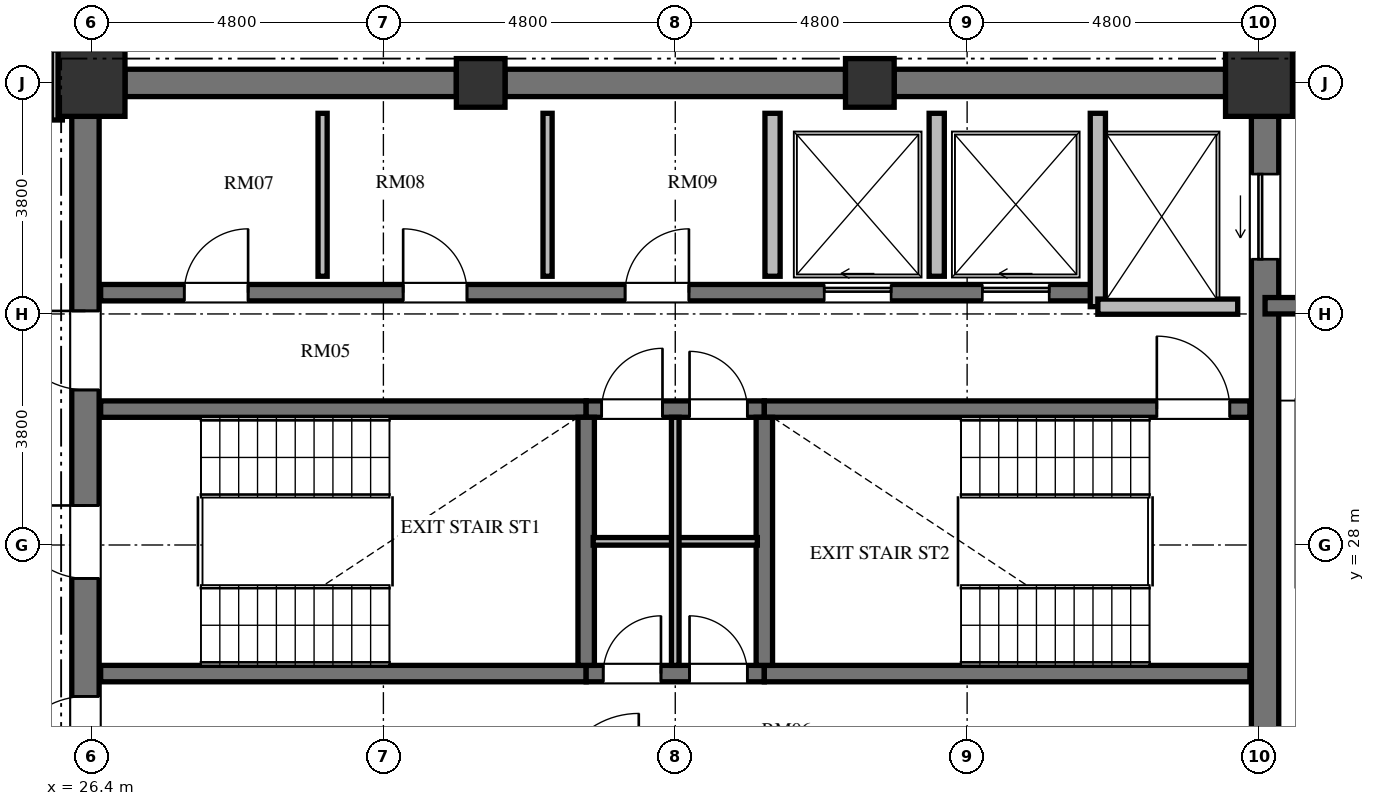
"""IFC4 building model, lengths in metres.
Left out: names, types, materials, properties, quantities, classifications, styles, units other than length and angle.
Written with IfcOpenShell. Run it as: python <this file> out.ifc"""

import sys

from ifc_helpers import new_model, si_unit, direction, frame, frame_2d, origin, origin_2d, place, context, subcontext, project, spatial, rectangle, extrude, element, fill, save


model = new_model("IFC4")
c1 = context("Model", 3, precision=1e-05, world=origin(), true_north=direction((0.0, 1.0)))
c2 = subcontext(c1, "Body", "Model", "MODEL_VIEW")
j1 = project(units=[si_unit("LENGTHUNIT", "METRE"), si_unit("PLANEANGLEUNIT", "RADIAN")], contexts=[c1])
p1 = place(None, origin())
s1 = spatial("IfcSite", under=j1, at=p1, CompositionType="ELEMENT")
p2 = place(p1, origin())
s2 = spatial("IfcBuilding", under=s1, at=p2, CompositionType="ELEMENT")
p3 = place(p2, frame((0.0, 0.0, 231.312)))
s3 = spatial("IfcBuildingStorey", under=s2, at=p3, CompositionType="ELEMENT", Elevation=231.312)
p4 = place(p3, frame((45.6, 35.6, 0.0), z_axis=(0.0, 0.0, 1.0), x_axis=(1.0, 0.0, 0.0)))
e1 = element("IfcColumn", 1, at=p4, inside=s3, PredefinedType="COLUMN", context=c2, shape_type="SweptSolid", body=[
    extrude(rectangle(XDim=1.1, YDim=1.1, at=origin_2d()), origin(), (0.0, 0.0, 1.0), 3.648),
])
for number, where, z_axis, x_axis in (
    (2, (39.2, 35.6, 0.0), (0.0, 0.0, 1.0), (1.0, 0.0, 0.0)),
    (3, (32.8, 35.6, 0.0), (0.0, 0.0, 1.0), (1.0, 0.0, 0.0)),
):
    element("IfcColumn", number, at=place(p3, frame(where, z_axis=z_axis, x_axis=x_axis)), inside=s3, PredefinedType="COLUMN", context=c2, shape_type="SweptSolid", body=[
        extrude(rectangle(XDim=0.8, YDim=0.8, at=origin_2d()), origin(), (0.0, 0.0, 1.0), 3.648),
    ])
p5 = place(p3, frame((26.4, 35.6, 0.0), z_axis=(0.0, 0.0, 1.0), x_axis=(1.0, 0.0, 0.0)))
e4 = element("IfcColumn", 4, at=p5, inside=s3, PredefinedType="COLUMN", context=c2, shape_type="SweptSolid", body=[
    extrude(rectangle(XDim=1.1, YDim=1.1, at=origin_2d()), origin(), (0.0, 0.0, 1.0), 3.648),
])
p6 = place(p3, frame((26.3, 20.95, 0.0), z_axis=(0.0, 0.0, 1.0), x_axis=(0.0, 1.0, 0.0)))
e5 = element("IfcWall", 5, at=p6, inside=s3, PredefinedType="SHEAR", context=c2, shape_type="SweptSolid", body=[
    extrude(rectangle(XDim=14.1, YDim=0.45, at=frame_2d((7.05, 0.0))), origin(), (0.0, 0.0, 1.0), 3.648),
])
p7 = place(p6, frame((6.5, 0.0, 0.0)))
e6 = element("IfcOpeningElement", 6, at=p7, cuts=e5, PredefinedType="OPENING", context=c2, shape_type="SweptSolid", body=[
    extrude(rectangle(XDim=1.2, YDim=2.15, at=frame_2d((0.6, 1.075))), frame((0.0, 0.235, 0.0), z_axis=(0.0, -1.0, 0.0), x_axis=(1.0, 0.0, 0.0)), (0.0, 0.0, 1.0), 0.47),
])
p8 = place(p6, frame((9.6, 0.0, 0.0)))
e7 = element("IfcOpeningElement", 7, at=p8, cuts=e5, PredefinedType="OPENING", context=c2, shape_type="SweptSolid", body=[
    extrude(rectangle(XDim=1.3, YDim=2.2, at=frame_2d((0.65, 1.1))), frame((0.0, 0.235, 0.0), z_axis=(0.0, -1.0, 0.0), x_axis=(1.0, 0.0, 0.0)), (0.0, 0.0, 1.0), 0.47),
])
p9 = place(p6, frame((3.26, 0.0, 0.0)))
e8 = element("IfcOpeningElement", 8, at=p9, cuts=e5, PredefinedType="OPENING", context=c2, shape_type="SweptSolid", body=[
    extrude(rectangle(XDim=1.3, YDim=2.2, at=frame_2d((0.65, 1.1))), frame((0.0, 0.235, 0.0), z_axis=(0.0, -1.0, 0.0), x_axis=(1.0, 0.0, 0.0)), (0.0, 0.0, 1.0), 0.47),
])
p10 = place(p3, frame((45.7, 20.95, 0.0), z_axis=(0.0, 0.0, 1.0), x_axis=(0.0, 1.0, 0.0)))
e9 = element("IfcWall", 9, at=p10, inside=s3, PredefinedType="SHEAR", context=c2, shape_type="SweptSolid", body=[
    extrude(rectangle(XDim=14.1, YDim=0.45, at=frame_2d((7.05, 0.0))), origin(), (0.0, 0.0, 1.0), 3.648),
])
p11 = place(p10, frame((11.75, 0.0, 0.0)))
e10 = element("IfcOpeningElement", 10, at=p11, cuts=e9, PredefinedType="OPENING", context=c2, shape_type="SweptSolid", body=[
    extrude(rectangle(XDim=1.4, YDim=2.3, at=frame_2d((0.7, 1.15))), frame((0.0, 0.235, 0.0), z_axis=(0.0, -1.0, 0.0), x_axis=(1.0, 0.0, 0.0)), (0.0, 0.0, 1.0), 0.47),
])
p12 = place(p10, frame((0.95, 0.0, 0.0)))
e11 = element("IfcOpeningElement", 11, at=p12, cuts=e9, PredefinedType="OPENING", context=c2, shape_type="SweptSolid", body=[
    extrude(rectangle(XDim=1.4, YDim=2.3, at=frame_2d((0.7, 1.15))), frame((0.0, 0.235, 0.0), z_axis=(0.0, -1.0, 0.0), x_axis=(1.0, 0.0, 0.0)), (0.0, 0.0, 1.0), 0.47),
])
p13 = place(p3, frame((26.95, 35.6, 0.0), z_axis=(0.0, 0.0, 1.0), x_axis=(1.0, 0.0, 0.0)))
e12 = element("IfcWall", 12, at=p13, inside=s3, PredefinedType="SHEAR", context=c2, shape_type="SweptSolid", body=[
    extrude(rectangle(XDim=5.45, YDim=0.45, at=frame_2d((2.725, 0.0))), origin(), (0.0, 0.0, 1.0), 3.648),
])
p14 = place(p3, frame((33.2, 35.6, 0.0), z_axis=(0.0, 0.0, 1.0), x_axis=(1.0, 0.0, 0.0)))
e13 = element("IfcWall", 13, at=p14, inside=s3, PredefinedType="SHEAR", context=c2, shape_type="SweptSolid", body=[
    extrude(rectangle(XDim=5.6, YDim=0.45, at=frame_2d((2.8, 0.0))), origin(), (0.0, 0.0, 1.0), 3.648),
])
p15 = place(p3, frame((39.6, 35.6, 0.0), z_axis=(0.0, 0.0, 1.0), x_axis=(1.0, 0.0, 0.0)))
e14 = element("IfcWall", 14, at=p15, inside=s3, PredefinedType="SHEAR", context=c2, shape_type="SweptSolid", body=[
    extrude(rectangle(XDim=5.45, YDim=0.45, at=frame_2d((2.725, 0.0))), origin(), (0.0, 0.0, 1.0), 3.648),
])
p16 = place(p3, frame((26.55, 30.235, 0.0), z_axis=(0.0, 0.0, 1.0), x_axis=(1.0, 0.0, 0.0)))
e15 = element("IfcWall", 15, at=p16, inside=s3, PredefinedType="SHEAR", context=c2, shape_type="SweptSolid", body=[
    extrude(rectangle(XDim=7.985, YDim=0.27, at=frame_2d((3.992, 0.0))), origin(), (0.0, 0.0, 1.0), 3.648),
])
p17 = place(p3, frame((34.535, 30.235, 0.0), z_axis=(0.0, 0.0, 1.0), x_axis=(1.0, 0.0, 0.0)))
e16 = element("IfcWall", 16, at=p17, inside=s3, PredefinedType="SHEAR", context=c2, shape_type="SweptSolid", body=[
    extrude(rectangle(XDim=2.93, YDim=0.27, at=frame_2d((1.465, 0.0))), origin(), (0.0, 0.0, 1.0), 3.648),
])
p18 = place(p17, frame((0.255, 0.0, 0.0)))
e17 = element("IfcOpeningElement", 17, at=p18, cuts=e16, PredefinedType="OPENING", context=c2, shape_type="SweptSolid", body=[
    extrude(rectangle(XDim=1.0, YDim=2.1, at=frame_2d((0.5, 1.05))), frame((0.0, 0.145, 0.0), z_axis=(0.0, -1.0, 0.0), x_axis=(1.0, 0.0, 0.0)), (0.0, 0.0, 1.0), 0.29),
])
p19 = place(p17, frame((1.7, 0.0, 0.0)))
e18 = element("IfcOpeningElement", 18, at=p19, cuts=e16, PredefinedType="OPENING", context=c2, shape_type="SweptSolid", body=[
    extrude(rectangle(XDim=0.95, YDim=2.1, at=frame_2d((0.475, 1.05))), frame((0.0, 0.145, 0.0), z_axis=(0.0, -1.0, 0.0), x_axis=(1.0, 0.0, 0.0)), (0.0, 0.0, 1.0), 0.29),
])
p20 = place(p3, frame((37.465, 30.235, 0.0), z_axis=(0.0, 0.0, 1.0), x_axis=(1.0, 0.0, 0.0)))
e19 = element("IfcWall", 19, at=p20, inside=s3, PredefinedType="SHEAR", context=c2, shape_type="SweptSolid", body=[
    extrude(rectangle(XDim=7.985, YDim=0.27, at=frame_2d((3.992, 0.0))), origin(), (0.0, 0.0, 1.0), 3.648),
])
p21 = place(p20, frame((6.455, 0.0, 0.0)))
e20 = element("IfcOpeningElement", 20, at=p21, cuts=e19, PredefinedType="OPENING", context=c2, shape_type="SweptSolid", body=[
    extrude(rectangle(XDim=1.2, YDim=2.15, at=frame_2d((0.6, 1.075))), frame((0.0, 0.145, 0.0), z_axis=(0.0, -1.0, 0.0), x_axis=(1.0, 0.0, 0.0)), (0.0, 0.0, 1.0), 0.29),
])
p22 = place(p3, frame((26.55, 25.885, 0.0), z_axis=(0.0, 0.0, 1.0), x_axis=(1.0, 0.0, 0.0)))
e21 = element("IfcWall", 21, at=p22, inside=s3, PredefinedType="SHEAR", context=c2, shape_type="SweptSolid", body=[
    extrude(rectangle(XDim=7.985, YDim=0.27, at=frame_2d((3.992, 0.0))), origin(), (0.0, 0.0, 1.0), 3.648),
])
p23 = place(p3, frame((34.535, 25.885, 0.0), z_axis=(0.0, 0.0, 1.0), x_axis=(1.0, 0.0, 0.0)))
e22 = element("IfcWall", 22, at=p23, inside=s3, PredefinedType="SHEAR", context=c2, shape_type="SweptSolid", body=[
    extrude(rectangle(XDim=2.93, YDim=0.27, at=frame_2d((1.465, 0.0))), origin(), (0.0, 0.0, 1.0), 3.648),
])
p24 = place(p23, frame((0.28, 0.0, 0.0)))
e23 = element("IfcOpeningElement", 23, at=p24, cuts=e22, PredefinedType="OPENING", context=c2, shape_type="SweptSolid", body=[
    extrude(rectangle(XDim=0.95, YDim=2.1, at=frame_2d((0.475, 1.05))), frame((0.0, 0.145, 0.0), z_axis=(0.0, -1.0, 0.0), x_axis=(1.0, 0.0, 0.0)), (0.0, 0.0, 1.0), 0.29),
])
p25 = place(p23, frame((1.7, 0.0, 0.0)))
e24 = element("IfcOpeningElement", 24, at=p25, cuts=e22, PredefinedType="OPENING", context=c2, shape_type="SweptSolid", body=[
    extrude(rectangle(XDim=0.95, YDim=2.1, at=frame_2d((0.475, 1.05))), frame((0.0, 0.145, 0.0), z_axis=(0.0, -1.0, 0.0), x_axis=(1.0, 0.0, 0.0)), (0.0, 0.0, 1.0), 0.29),
])
p26 = place(p3, frame((37.465, 25.885, 0.0), z_axis=(0.0, 0.0, 1.0), x_axis=(1.0, 0.0, 0.0)))
e25 = element("IfcWall", 25, at=p26, inside=s3, PredefinedType="SHEAR", context=c2, shape_type="SweptSolid", body=[
    extrude(rectangle(XDim=7.985, YDim=0.27, at=frame_2d((3.992, 0.0))), origin(), (0.0, 0.0, 1.0), 3.648),
])
for number, where, z_axis, x_axis in (
    (26, (34.535, 26.02, 0.0), (0.0, 0.0, 1.0), (0.0, 1.0, 0.0)),
    (27, (37.465, 26.02, 0.0), (0.0, 0.0, 1.0), (0.0, 1.0, 0.0)),
):
    element("IfcWall", number, at=place(p3, frame(where, z_axis=z_axis, x_axis=x_axis)), inside=s3, PredefinedType="SHEAR", context=c2, shape_type="SweptSolid", body=[
        extrude(rectangle(XDim=4.08, YDim=0.27, at=frame_2d((2.04, 0.0))), origin(), (0.0, 0.0, 1.0), 3.648),
    ])
p27 = place(p3, frame((34.65, 28.06, 0.0), z_axis=(0.0, 0.0, 1.0), x_axis=(1.0, 0.0, 0.0)))
e28 = element("IfcWall", 28, at=p27, inside=s3, PredefinedType="PARTITIONING", context=c2, shape_type="SweptSolid", body=[
    extrude(rectangle(XDim=2.7, YDim=0.125, at=frame_2d((1.35, 0.0))), origin(), (0.0, 0.0, 1.0), 3.448),
])
p28 = place(p3, frame((36.0, 26.02, 0.0), z_axis=(0.0, 0.0, 1.0), x_axis=(0.0, 1.0, 0.0)))
e29 = element("IfcWall", 29, at=p28, inside=s3, PredefinedType="PARTITIONING", context=c2, shape_type="SweptSolid", body=[
    extrude(rectangle(XDim=4.08, YDim=0.125, at=frame_2d((2.04, 0.0))), origin(), (0.0, 0.0, 1.0), 3.448),
])
p29 = place(p3, frame((26.55, 32.15, 0.0), z_axis=(0.0, 0.0, 1.0), x_axis=(1.0, 0.0, 0.0)))
e30 = element("IfcWall", 30, at=p29, inside=s3, PredefinedType="SHEAR", context=c2, shape_type="SweptSolid", body=[
    extrude(rectangle(XDim=16.4, YDim=0.27, at=frame_2d((8.2, 0.0))), origin(), (0.0, 0.0, 1.0), 3.648),
])
p30 = place(p29, frame((1.375, 0.0, 0.0)))
e31 = element("IfcOpeningElement", 31, at=p30, cuts=e30, PredefinedType="OPENING", context=c2, shape_type="SweptSolid", body=[
    extrude(rectangle(XDim=1.05, YDim=2.15, at=frame_2d((0.525, 1.075))), frame((0.0, 0.145, 0.0), z_axis=(0.0, -1.0, 0.0), x_axis=(1.0, 0.0, 0.0)), (0.0, 0.0, 1.0), 0.29),
])
p31 = place(p29, frame((4.975, 0.0, 0.0)))
e32 = element("IfcOpeningElement", 32, at=p31, cuts=e30, PredefinedType="OPENING", context=c2, shape_type="SweptSolid", body=[
    extrude(rectangle(XDim=1.05, YDim=2.15, at=frame_2d((0.525, 1.075))), frame((0.0, 0.145, 0.0), z_axis=(0.0, -1.0, 0.0), x_axis=(1.0, 0.0, 0.0)), (0.0, 0.0, 1.0), 0.29),
])
p32 = place(p29, frame((8.625, 0.0, 0.0)))
e33 = element("IfcOpeningElement", 33, at=p32, cuts=e30, PredefinedType="OPENING", context=c2, shape_type="SweptSolid", body=[
    extrude(rectangle(XDim=1.05, YDim=2.15, at=frame_2d((0.525, 1.075))), frame((0.0, 0.145, 0.0), z_axis=(0.0, -1.0, 0.0), x_axis=(1.0, 0.0, 0.0)), (0.0, 0.0, 1.0), 0.29),
])
p33 = place(p29, frame((11.9, 0.0, 0.0)))
e34 = element("IfcOpeningElement", 34, at=p33, cuts=e30, PredefinedType="OPENING", context=c2, shape_type="SweptSolid", body=[
    extrude(rectangle(XDim=1.1, YDim=2.2, at=frame_2d((0.55, 1.1))), frame((0.0, 0.145, 0.0), z_axis=(0.0, -1.0, 0.0), x_axis=(1.0, 0.0, 0.0)), (0.0, 0.0, 1.0), 0.29),
])
p34 = place(p29, frame((14.5, 0.0, 0.0)))
e35 = element("IfcOpeningElement", 35, at=p34, cuts=e30, PredefinedType="OPENING", context=c2, shape_type="SweptSolid", body=[
    extrude(rectangle(XDim=1.1, YDim=2.2, at=frame_2d((0.55, 1.1))), frame((0.0, 0.145, 0.0), z_axis=(0.0, -1.0, 0.0), x_axis=(1.0, 0.0, 0.0)), (0.0, 0.0, 1.0), 0.29),
])
p35 = place(p3, frame((42.95, 31.92, 0.0), z_axis=(0.0, 0.0, 1.0), x_axis=(0.0, 1.0, 0.0)))
e36 = element("IfcWall", 36, at=p35, inside=s3, PredefinedType="SOLIDWALL", context=c2, shape_type="SweptSolid", body=[
    extrude(rectangle(XDim=3.18, YDim=0.25, at=frame_2d((1.59, 0.0))), origin(), (0.0, 0.0, 1.0), 3.448),
])
p36 = place(p3, frame((42.95, 31.92, 0.0), z_axis=(0.0, 0.0, 1.0), x_axis=(1.0, 0.0, 0.0)))
e37 = element("IfcWall", 37, at=p36, inside=s3, PredefinedType="SOLIDWALL", context=c2, shape_type="SweptSolid", body=[
    extrude(rectangle(XDim=2.3, YDim=0.25, at=frame_2d((1.15, 0.0))), origin(), (0.0, 0.0, 1.0), 3.448),
])
for number, where, z_axis, x_axis in (
    (38, (37.6, 32.42, 0.0), (0.0, 0.0, 1.0), (0.0, 1.0, 0.0)),
    (39, (40.3, 32.42, 0.0), (0.0, 0.0, 1.0), (0.0, 1.0, 0.0)),
):
    element("IfcWall", number, at=place(p3, frame(where, z_axis=z_axis, x_axis=x_axis)), inside=s3, PredefinedType="SOLIDWALL", context=c2, shape_type="SweptSolid", body=[
        extrude(rectangle(XDim=2.68, YDim=0.25, at=frame_2d((1.34, 0.0))), origin(), (0.0, 0.0, 1.0), 3.448),
    ])
for number, where, z_axis, x_axis in (
    (40, (30.2, 32.42, 0.0), (0.0, 0.0, 1.0), (0.0, 1.0, 0.0)),
    (41, (33.9, 32.42, 0.0), (0.0, 0.0, 1.0), (0.0, 1.0, 0.0)),
):
    element("IfcWall", number, at=place(p3, frame(where, z_axis=z_axis, x_axis=x_axis)), inside=s3, PredefinedType="PARTITIONING", context=c2, shape_type="SweptSolid", body=[
        extrude(rectangle(XDim=2.68, YDim=0.15, at=frame_2d((1.34, 0.0))), origin(), (0.0, 0.0, 1.0), 3.448),
    ])
p37 = place(p3, frame((45.925, 35.98, 0.0), z_axis=(0.0, 0.0, 1.0), x_axis=(1.0, 0.0, 0.0)))
e42 = element("IfcWall", 42, at=p37, inside=s3, PredefinedType="SHEAR", context=c2, shape_type="SweptSolid", body=[
    extrude(rectangle(XDim=4.625, YDim=0.27, at=frame_2d((2.312, 0.0))), origin(), (0.0, 0.0, 1.0), 3.648),
])
p38 = place(p3, frame((45.7, 31.935, 0.0), z_axis=(0.0, 0.0, 1.0), x_axis=(1.0, 0.0, 0.0)))
e43 = element("IfcWall", 43, at=p38, inside=s3, PredefinedType="SHEAR", context=c2, shape_type="SweptSolid", body=[
    extrude(rectangle(XDim=4.715, YDim=0.27, at=frame_2d((2.357, 0.0))), origin(), (0.0, 0.0, 1.0), 3.648),
])
p39 = place(p3, frame((25.83, 36.14, 0.0), z_axis=(0.0, 0.0, 1.0), x_axis=(0.0, -1.0, 0.0)))
e44 = element("IfcWall", 44, at=p39, inside=s3, PredefinedType="PARTITIONING", context=c2, shape_type="SweptSolid", body=[
    extrude(rectangle(XDim=1.15, YDim=0.18, at=frame_2d((0.575, 0.0))), origin(), (0.0, 0.0, 1.0), 3.448),
])
p40 = place(p7, origin())
e45 = element("IfcDoor", 45, at=p40, inside=s3, OperationType="SINGLE_SWING_RIGHT", PredefinedType="DOOR", context=c2, shape_type="SweptSolid", body=[
    extrude(rectangle(XDim=1.2, YDim=2.15, at=frame_2d((0.6, 1.075))), frame((0.0, 0.025, 0.0), z_axis=(0.0, -1.0, 0.0), x_axis=(1.0, 0.0, 0.0)), (0.0, 0.0, 1.0), 0.05),
])
fill(e6, e45)
p41 = place(p21, origin())
e46 = element("IfcDoor", 46, at=p41, inside=s3, OperationType="SINGLE_SWING_LEFT", PredefinedType="DOOR", context=c2, shape_type="SweptSolid", body=[
    extrude(rectangle(XDim=1.2, YDim=2.15, at=frame_2d((0.6, 1.075))), frame((0.0, 0.025, 0.0), z_axis=(0.0, -1.0, 0.0), x_axis=(1.0, 0.0, 0.0)), (0.0, 0.0, 1.0), 0.05),
])
fill(e20, e46)
p42 = place(p24, origin())
e47 = element("IfcDoor", 47, at=p42, inside=s3, OperationType="SINGLE_SWING_RIGHT", PredefinedType="DOOR", context=c2, shape_type="SweptSolid", body=[
    extrude(rectangle(XDim=0.95, YDim=2.1, at=frame_2d((0.475, 1.05))), frame((0.0, 0.025, 0.0), z_axis=(0.0, -1.0, 0.0), x_axis=(1.0, 0.0, 0.0)), (0.0, 0.0, 1.0), 0.05),
])
fill(e23, e47)
p43 = place(p25, origin())
e48 = element("IfcDoor", 48, at=p43, inside=s3, OperationType="SINGLE_SWING_LEFT", PredefinedType="DOOR", context=c2, shape_type="SweptSolid", body=[
    extrude(rectangle(XDim=0.95, YDim=2.1, at=frame_2d((0.475, 1.05))), frame((0.0, 0.025, 0.0), z_axis=(0.0, -1.0, 0.0), x_axis=(1.0, 0.0, 0.0)), (0.0, 0.0, 1.0), 0.05),
])
fill(e24, e48)
p44 = place(p18, origin())
e49 = element("IfcDoor", 49, at=p44, inside=s3, OperationType="SINGLE_SWING_RIGHT", PredefinedType="DOOR", context=c2, shape_type="SweptSolid", body=[
    extrude(rectangle(XDim=1.0, YDim=2.1, at=frame_2d((0.5, 1.05))), frame((0.0, 0.025, 0.0), z_axis=(0.0, -1.0, 0.0), x_axis=(1.0, 0.0, 0.0)), (0.0, 0.0, 1.0), 0.05),
])
fill(e17, e49)
p45 = place(p19, origin())
e50 = element("IfcDoor", 50, at=p45, inside=s3, OperationType="SINGLE_SWING_LEFT", PredefinedType="DOOR", context=c2, shape_type="SweptSolid", body=[
    extrude(rectangle(XDim=0.95, YDim=2.1, at=frame_2d((0.475, 1.05))), frame((0.0, 0.025, 0.0), z_axis=(0.0, -1.0, 0.0), x_axis=(1.0, 0.0, 0.0)), (0.0, 0.0, 1.0), 0.05),
])
fill(e18, e50)
p46 = place(p8, origin())
e51 = element("IfcDoor", 51, at=p46, inside=s3, OperationType="SINGLE_SWING_RIGHT", PredefinedType="DOOR", context=c2, shape_type="SweptSolid", body=[
    extrude(rectangle(XDim=1.3, YDim=2.2, at=frame_2d((0.65, 1.1))), frame((0.0, 0.025, 0.0), z_axis=(0.0, -1.0, 0.0), x_axis=(1.0, 0.0, 0.0)), (0.0, 0.0, 1.0), 0.05),
])
fill(e7, e51)
p47 = place(p9, origin())
e52 = element("IfcDoor", 52, at=p47, inside=s3, OperationType="SINGLE_SWING_LEFT", PredefinedType="DOOR", context=c2, shape_type="SweptSolid", body=[
    extrude(rectangle(XDim=1.3, YDim=2.2, at=frame_2d((0.65, 1.1))), frame((0.0, 0.025, 0.0), z_axis=(0.0, -1.0, 0.0), x_axis=(1.0, 0.0, 0.0)), (0.0, 0.0, 1.0), 0.05),
])
fill(e8, e52)
p48 = place(p30, origin())
e53 = element("IfcDoor", 53, at=p48, inside=s3, OperationType="SINGLE_SWING_RIGHT", PredefinedType="DOOR", context=c2, shape_type="SweptSolid", body=[
    extrude(rectangle(XDim=1.05, YDim=2.15, at=frame_2d((0.525, 1.075))), frame((0.0, 0.025, 0.0), z_axis=(0.0, -1.0, 0.0), x_axis=(1.0, 0.0, 0.0)), (0.0, 0.0, 1.0), 0.05),
])
fill(e31, e53)
p49 = place(p31, origin())
e54 = element("IfcDoor", 54, at=p49, inside=s3, OperationType="SINGLE_SWING_LEFT", PredefinedType="DOOR", context=c2, shape_type="SweptSolid", body=[
    extrude(rectangle(XDim=1.05, YDim=2.15, at=frame_2d((0.525, 1.075))), frame((0.0, 0.025, 0.0), z_axis=(0.0, -1.0, 0.0), x_axis=(1.0, 0.0, 0.0)), (0.0, 0.0, 1.0), 0.05),
])
fill(e32, e54)
p50 = place(p32, origin())
e55 = element("IfcDoor", 55, at=p50, inside=s3, OperationType="SINGLE_SWING_RIGHT", PredefinedType="DOOR", context=c2, shape_type="SweptSolid", body=[
    extrude(rectangle(XDim=1.05, YDim=2.15, at=frame_2d((0.525, 1.075))), frame((0.0, 0.025, 0.0), z_axis=(0.0, -1.0, 0.0), x_axis=(1.0, 0.0, 0.0)), (0.0, 0.0, 1.0), 0.05),
])
fill(e33, e55)
p51 = place(p33, origin())
e56 = element("IfcDoor", 56, at=p51, inside=s3, OperationType="SLIDING_TO_LEFT", PredefinedType="DOOR", context=c2, shape_type="SweptSolid", body=[
    extrude(rectangle(XDim=1.1, YDim=2.2, at=frame_2d((0.55, 1.1))), frame((0.0, 0.025, 0.0), z_axis=(0.0, -1.0, 0.0), x_axis=(1.0, 0.0, 0.0)), (0.0, 0.0, 1.0), 0.05),
])
fill(e34, e56)
p52 = place(p34, origin())
e57 = element("IfcDoor", 57, at=p52, inside=s3, OperationType="SLIDING_TO_LEFT", PredefinedType="DOOR", context=c2, shape_type="SweptSolid", body=[
    extrude(rectangle(XDim=1.1, YDim=2.2, at=frame_2d((0.55, 1.1))), frame((0.0, 0.025, 0.0), z_axis=(0.0, -1.0, 0.0), x_axis=(1.0, 0.0, 0.0)), (0.0, 0.0, 1.0), 0.05),
])
fill(e35, e57)
p53 = place(p11, origin())
e58 = element("IfcDoor", 58, at=p53, inside=s3, OperationType="SLIDING_TO_LEFT", PredefinedType="DOOR", context=c2, shape_type="SweptSolid", body=[
    extrude(rectangle(XDim=1.4, YDim=2.3, at=frame_2d((0.7, 1.15))), frame((0.0, 0.025, 0.0), z_axis=(0.0, -1.0, 0.0), x_axis=(1.0, 0.0, 0.0)), (0.0, 0.0, 1.0), 0.05),
])
fill(e10, e58)
save(model, sys.argv[1])
